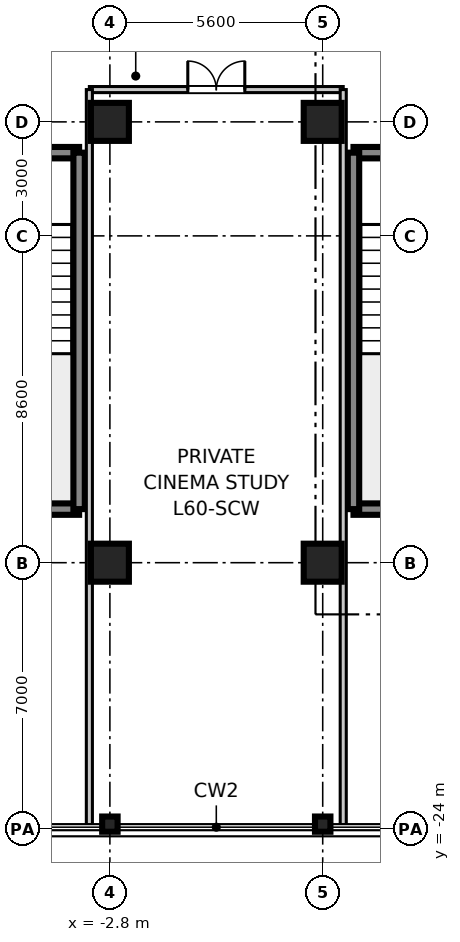
"""IFC4 building model, lengths in metres.
Left out: names, types, materials, properties, quantities, classifications, styles, units other than length and angle.
Written with IfcOpenShell. Run it as: python <this file> out.ifc"""

import sys

from ifc_helpers import new_model, si_unit, direction, frame, frame_2d, origin, origin_2d, place, context, subcontext, project, spatial, rectangle, i_section, extrude, source, transform, mapped, element, fill, save


model = new_model("IFC4")
c1 = context("Model", 3, precision=1e-05, world=origin(), true_north=direction((0.0, 1.0)))
c2 = subcontext(c1, "Body", "Model", "MODEL_VIEW")
j1 = project(units=[si_unit("LENGTHUNIT", "METRE"), si_unit("PLANEANGLEUNIT", "RADIAN")], contexts=[c1])
p1 = place(None, origin())
s1 = spatial("IfcSite", under=j1, at=p1, CompositionType="ELEMENT")
p2 = place(p1, origin())
s2 = spatial("IfcBuilding", under=s1, at=p2, CompositionType="ELEMENT")
p3 = place(p2, frame((0.0, 0.0, 234.5)))
s3 = spatial("IfcBuildingStorey", under=s2, at=p3, CompositionType="ELEMENT", Elevation=234.5)
m1 = source(origin(), c2, "Body", "SweptSolid", [
    extrude(rectangle(XDim=1.0, YDim=1.0, at=origin_2d()), origin(), (0.0, 0.0, 1.0), 3.655),
])
for number, where, z_axis, x_axis in (
    (1, (-2.8, -17.0, 0.0), (0.0, 0.0, 1.0), (1.0, 0.0, 0.0)),
    (2, (-2.8, -5.4, 0.0), (0.0, 0.0, 1.0), (1.0, 0.0, 0.0)),
    (3, (2.8, -17.0, 0.0), (0.0, 0.0, 1.0), (1.0, 0.0, 0.0)),
    (4, (2.8, -5.4, 0.0), (0.0, 0.0, 1.0), (1.0, 0.0, 0.0)),
):
    element("IfcColumn", number, at=place(p3, frame(where, z_axis=z_axis, x_axis=x_axis)), inside=s3, PredefinedType="COLUMN", context=c2, shape_type="MappedRepresentation", body=[
        mapped(m1, transform((0.0, 0.0, 0.0), scale=1.0)),
    ])
m2 = source(origin(), c2, "Body", "SweptSolid", [
    extrude(i_section(OverallWidth=0.401, OverallDepth=0.406, WebThickness=0.016, FlangeThickness=0.025, at=origin_2d()), origin(), (0.0, 0.0, 1.0), 3.655),
])
for number, where, z_axis, x_axis in (
    (5, (-2.8, -23.88, 0.0), (0.0, 0.0, 1.0), (0.0, 1.0, 0.0)),
    (6, (2.8, -23.88, 0.0), (0.0, 0.0, 1.0), (0.0, 1.0, 0.0)),
):
    element("IfcColumn", number, at=place(p3, frame(where, z_axis=z_axis, x_axis=x_axis)), inside=s3, PredefinedType="COLUMN", context=c2, shape_type="MappedRepresentation", body=[
        mapped(m2, transform((0.0, 0.0, 0.0), scale=1.0)),
    ])
m3 = source(origin(), c2, "Body", "SweptSolid", [
    extrude(rectangle(XDim=3.98, YDim=0.3, at=frame_2d((1.99, 0.0))), origin(), (0.0, 0.0, 1.0), 3.41),
])
for number, where, z_axis, x_axis in (
    (7, (3.61, -15.59, 0.0), (0.0, 0.0, 1.0), (1.0, 0.0, 0.0)),
    (8, (3.61, -6.21, 0.0), (0.0, 0.0, 1.0), (1.0, 0.0, 0.0)),
):
    element("IfcWall", number, at=place(p3, frame(where, z_axis=z_axis, x_axis=x_axis)), inside=s3, PredefinedType="SHEAR", context=c2, shape_type="MappedRepresentation", body=[
        mapped(m3, transform((0.0, 0.0, 0.0), scale=1.0)),
    ])
m4 = source(origin(), c2, "Body", "SweptSolid", [
    extrude(rectangle(XDim=9.38, YDim=0.3, at=frame_2d((4.69, 0.0))), origin(), (0.0, 0.0, 1.0), 3.41),
])
p4 = place(p3, frame((3.61, -15.59, 0.0), z_axis=(0.0, 0.0, 1.0), x_axis=(0.0, 1.0, 0.0)))
e9 = element("IfcWall", 9, at=p4, inside=s3, PredefinedType="SHEAR", context=c2, shape_type="MappedRepresentation", body=[
    mapped(m4, transform((0.0, 0.0, 0.0), scale=1.0)),
])
p5 = place(p3, frame((-7.59, -15.59, 0.0), z_axis=(0.0, 0.0, 1.0), x_axis=(1.0, 0.0, 0.0)))
e10 = element("IfcWall", 10, at=p5, inside=s3, PredefinedType="SHEAR", context=c2, shape_type="MappedRepresentation", body=[
    mapped(m3, transform((0.0, 0.0, 0.0), scale=1.0)),
])
p6 = place(p3, frame((-7.59, -6.21, 0.0), z_axis=(0.0, 0.0, 1.0), x_axis=(1.0, 0.0, 0.0)))
e11 = element("IfcWall", 11, at=p6, inside=s3, PredefinedType="SHEAR", context=c2, shape_type="MappedRepresentation", body=[
    mapped(m3, transform((0.0, 0.0, 0.0), scale=1.0)),
])
p7 = place(p6, frame((1.44, 0.0, 0.0)))
e12 = element("IfcOpeningElement", 12, at=p7, cuts=e11, PredefinedType="OPENING", context=c2, shape_type="SweptSolid", body=[
    extrude(rectangle(XDim=1.1, YDim=2.15, at=frame_2d((0.55, 1.075))), frame((0.0, 0.16, 0.0), z_axis=(0.0, -1.0, 0.0), x_axis=(1.0, 0.0, 0.0)), (0.0, 0.0, 1.0), 0.32),
])
p8 = place(p3, frame((-3.61, -15.59, 0.0), z_axis=(0.0, 0.0, 1.0), x_axis=(0.0, 1.0, 0.0)))
e13 = element("IfcWall", 13, at=p8, inside=s3, PredefinedType="SHEAR", context=c2, shape_type="MappedRepresentation", body=[
    mapped(m4, transform((0.0, 0.0, 0.0), scale=1.0)),
])
m5 = source(origin(), c2, "Body", "SweptSolid", [
    extrude(rectangle(XDim=6.68, YDim=0.16, at=frame_2d((3.34, 0.0))), origin(), (0.0, 0.0, 1.0), 2.75),
])
p9 = place(p3, frame((-3.34, -4.55, 0.0), z_axis=(0.0, 0.0, 1.0), x_axis=(1.0, 0.0, 0.0)))
e14 = element("IfcWall", 14, at=p9, inside=s3, PredefinedType="PARTITIONING", context=c2, shape_type="MappedRepresentation", body=[
    mapped(m5, transform((0.0, 0.0, 0.0), scale=1.0)),
])
p10 = place(p9, frame((2.59, 0.0, 0.0)))
e15 = element("IfcOpeningElement", 15, at=p10, cuts=e14, PredefinedType="OPENING", context=c2, shape_type="SweptSolid", body=[
    extrude(rectangle(XDim=1.5, YDim=2.15, at=frame_2d((0.75, 1.075))), frame((0.0, 0.09, 0.0), z_axis=(0.0, -1.0, 0.0), x_axis=(1.0, 0.0, 0.0)), (0.0, 0.0, 1.0), 0.18),
])
m6 = source(origin(), c2, "Body", "SweptSolid", [
    extrude(rectangle(XDim=19.35, YDim=0.16, at=frame_2d((9.675, 0.0))), origin(), (0.0, 0.0, 1.0), 2.75),
])
for number, where, z_axis, x_axis in (
    (16, (-3.34, -23.9, 0.0), (0.0, 0.0, 1.0), (0.0, 1.0, 0.0)),
    (17, (3.34, -23.9, 0.0), (0.0, 0.0, 1.0), (0.0, 1.0, 0.0)),
):
    element("IfcWall", number, at=place(p3, frame(where, z_axis=z_axis, x_axis=x_axis)), inside=s3, PredefinedType="PARTITIONING", context=c2, shape_type="MappedRepresentation", body=[
        mapped(m6, transform((0.0, 0.0, 0.0), scale=1.0)),
    ])
m7 = source(origin(), c2, "Body", "SweptSolid", [
    extrude(rectangle(XDim=1.5, YDim=2.15, at=frame_2d((0.75, 1.075))), frame((0.0, 0.025, 0.0), z_axis=(0.0, -1.0, 0.0), x_axis=(1.0, 0.0, 0.0)), (0.0, 0.0, 1.0), 0.05),
])
p11 = place(p10, frame((1.5, 0.0, 0.0), z_axis=(0.0, 0.0, 1.0), x_axis=(-1.0, 0.0, 0.0)))
e18 = element("IfcDoor", 18, at=p11, inside=s3, OperationType="DOUBLE_DOOR_SINGLE_SWING", PredefinedType="DOOR", context=c2, shape_type="MappedRepresentation", body=[
    mapped(m7, transform((0.0, 0.0, 0.0), scale=1.0)),
])
fill(e15, e18)
save(model, sys.argv[1])
